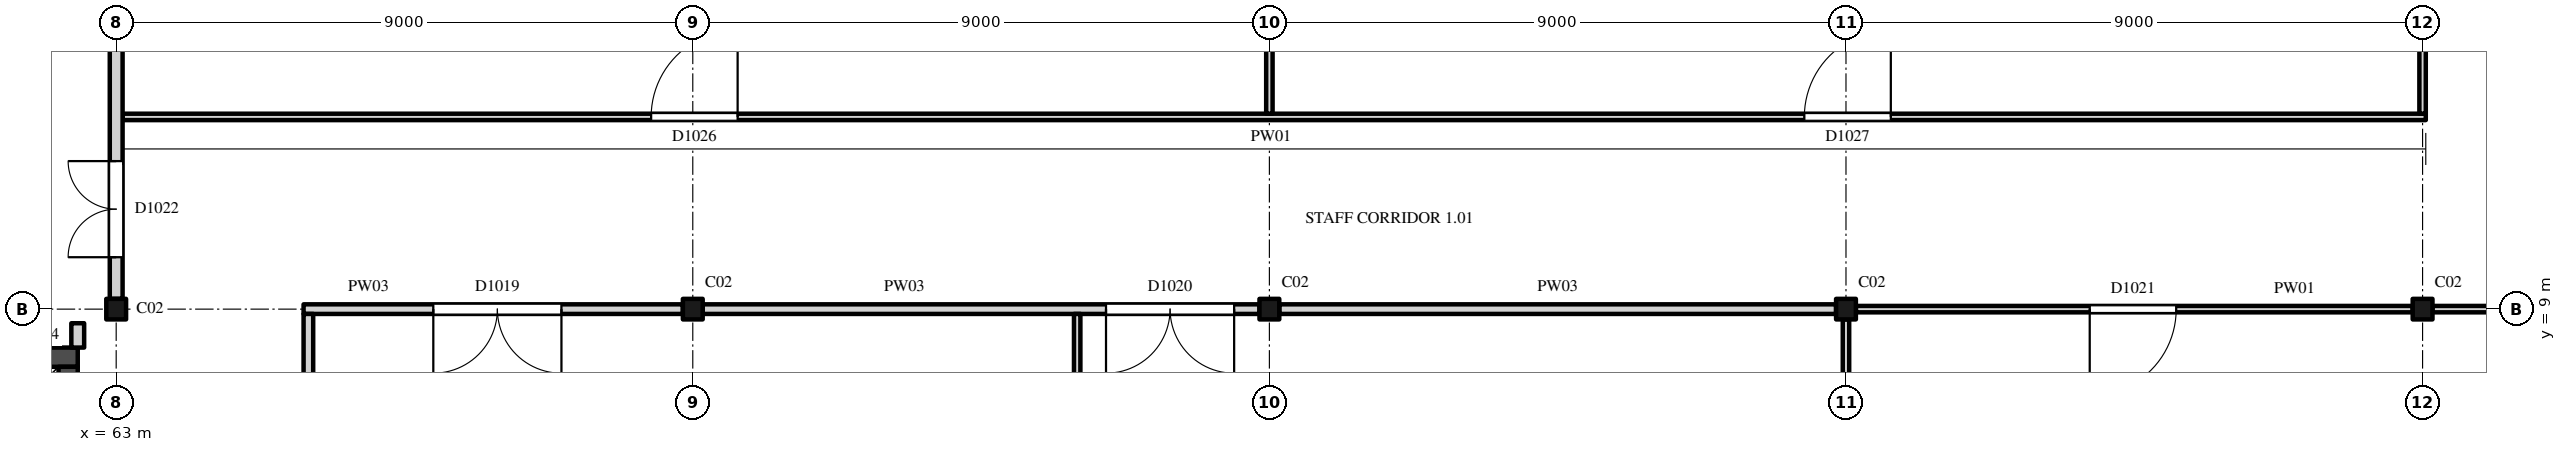
"""IFC4 building model, lengths in metres.
Left out: names, types, materials, properties, quantities, classifications, styles, units other than length and angle.
Written with IfcOpenShell. Run it as: python <this file> out.ifc"""

import sys

from ifc_helpers import new_model, si_unit, direction, frame, frame_2d, origin, origin_2d, place, context, subcontext, project, spatial, rectangle, i_section, extrude, element, fill, save


model = new_model("IFC4")
c1 = context("Model", 3, precision=1e-05, world=origin(), true_north=direction((0.0, 1.0)))
c2 = subcontext(c1, "Body", "Model", "MODEL_VIEW")
j1 = project(units=[si_unit("LENGTHUNIT", "METRE"), si_unit("PLANEANGLEUNIT", "RADIAN")], contexts=[c1])
p1 = place(None, origin())
s1 = spatial("IfcSite", under=j1, at=p1, CompositionType="ELEMENT")
p2 = place(p1, origin())
s2 = spatial("IfcBuilding", under=s1, at=p2, CompositionType="ELEMENT")
p3 = place(p2, frame((0.0, 0.0, 6.0)))
s3 = spatial("IfcBuildingStorey", under=s2, at=p3, CompositionType="ELEMENT", Elevation=6.0)
for number, where, z_axis, x_axis in (
    (1, (63.0, 9.0, 0.0), (0.0, 0.0, 1.0), (1.0, 0.0, 0.0)),
    (2, (72.0, 9.0, 0.0), (0.0, 0.0, 1.0), (1.0, 0.0, 0.0)),
    (3, (81.0, 9.0, 0.0), (0.0, 0.0, 1.0), (1.0, 0.0, 0.0)),
    (4, (90.0, 9.0, 0.0), (0.0, 0.0, 1.0), (1.0, 0.0, 0.0)),
    (5, (99.0, 9.0, 0.0), (0.0, 0.0, 1.0), (1.0, 0.0, 0.0)),
):
    element("IfcColumn", number, at=place(p3, frame(where, z_axis=z_axis, x_axis=x_axis)), inside=s3, PredefinedType="COLUMN", context=c2, shape_type="SweptSolid", body=[
        extrude(i_section(OverallWidth=0.309, OverallDepth=0.321, WebThickness=0.014, FlangeThickness=0.022, FilletRadius=0.017, at=origin_2d()), origin(), (0.0, 0.0, 1.0), 5.0),
    ])
p4 = place(p3, frame((54.3, 8.25, 0.0), z_axis=(0.0, 0.0, 1.0), x_axis=(1.0, 0.0, 0.0)))
e6 = element("IfcWall", 6, at=p4, inside=s3, PredefinedType="SHEAR", context=c2, shape_type="SweptSolid", body=[
    extrude(rectangle(XDim=8.1, YDim=0.3, at=frame_2d((4.05, 0.0))), origin(), (0.0, 0.0, 1.0), 5.0),
])
p5 = place(p3, frame((62.25, 0.3, 0.0), z_axis=(0.0, 0.0, 1.0), x_axis=(0.0, 1.0, 0.0)))
e7 = element("IfcWall", 7, at=p5, inside=s3, PredefinedType="SHEAR", context=c2, shape_type="SweptSolid", body=[
    extrude(rectangle(XDim=7.8, YDim=0.3, at=frame_2d((3.9, 0.0))), origin(), (0.0, 0.0, 1.0), 5.0),
])
p6 = place(p5, frame((3.6, 0.0, 0.0)))
e8 = element("IfcOpeningElement", 8, at=p6, cuts=e7, PredefinedType="OPENING", context=c2, shape_type="SweptSolid", body=[
    extrude(rectangle(XDim=1.2, YDim=2.1, at=frame_2d((0.6, 1.05))), frame((0.0, 0.16, 0.0), z_axis=(0.0, -1.0, 0.0), x_axis=(1.0, 0.0, 0.0)), (0.0, 0.0, 1.0), 0.32),
])
p7 = place(p3, frame((65.925, 9.0, 0.0), z_axis=(0.0, 0.0, 1.0), x_axis=(1.0, 0.0, 0.0)))
e9 = element("IfcWall", 9, at=p7, inside=s3, PredefinedType="PARTITIONING", context=c2, shape_type="SweptSolid", body=[
    extrude(rectangle(XDim=5.92, YDim=0.15, at=frame_2d((2.96, 0.0))), origin(), (0.0, 0.0, 1.0), 4.419),
])
p8 = place(p7, frame((2.025, 0.0, 0.0)))
e10 = element("IfcOpeningElement", 10, at=p8, cuts=e9, PredefinedType="OPENING", context=c2, shape_type="SweptSolid", body=[
    extrude(rectangle(XDim=2.0, YDim=2.4, at=frame_2d((1.0, 1.2))), frame((0.0, 0.085, 0.0), z_axis=(0.0, -1.0, 0.0), x_axis=(1.0, 0.0, 0.0)), (0.0, 0.0, 1.0), 0.17),
])
p9 = place(p3, frame((72.155, 9.0, 0.0), z_axis=(0.0, 0.0, 1.0), x_axis=(1.0, 0.0, 0.0)))
e11 = element("IfcWall", 11, at=p9, inside=s3, PredefinedType="PARTITIONING", context=c2, shape_type="SweptSolid", body=[
    extrude(rectangle(XDim=8.691, YDim=0.15, at=frame_2d((4.345, 0.0))), origin(), (0.0, 0.0, 1.0), 4.419),
])
p10 = place(p9, frame((6.295, 0.0, 0.0)))
e12 = element("IfcOpeningElement", 12, at=p10, cuts=e11, PredefinedType="OPENING", context=c2, shape_type="SweptSolid", body=[
    extrude(rectangle(XDim=2.0, YDim=2.4, at=frame_2d((1.0, 1.2))), frame((0.0, 0.085, 0.0), z_axis=(0.0, -1.0, 0.0), x_axis=(1.0, 0.0, 0.0)), (0.0, 0.0, 1.0), 0.17),
])
p11 = place(p3, frame((81.155, 9.0, 0.0), z_axis=(0.0, 0.0, 1.0), x_axis=(1.0, 0.0, 0.0)))
e13 = element("IfcWall", 13, at=p11, inside=s3, PredefinedType="PARTITIONING", context=c2, shape_type="SweptSolid", body=[
    extrude(rectangle(XDim=8.691, YDim=0.15, at=frame_2d((4.345, 0.0))), origin(), (0.0, 0.0, 1.0), 4.419),
])
p12 = place(p3, frame((90.155, 9.0, 0.0), z_axis=(0.0, 0.0, 1.0), x_axis=(1.0, 0.0, 0.0)))
e14 = element("IfcWall", 14, at=p12, inside=s3, PredefinedType="PARTITIONING", context=c2, shape_type="SweptSolid", body=[
    extrude(rectangle(XDim=8.691, YDim=0.1, at=frame_2d((4.345, 0.0))), origin(), (0.0, 0.0, 1.0), 4.419),
])
p13 = place(p12, frame((3.65, 0.0, 0.0)))
e15 = element("IfcOpeningElement", 15, at=p13, cuts=e14, PredefinedType="OPENING", context=c2, shape_type="SweptSolid", body=[
    extrude(rectangle(XDim=1.35, YDim=2.4, at=frame_2d((0.675, 1.2))), frame((0.0, 0.06, 0.0), z_axis=(0.0, -1.0, 0.0), x_axis=(1.0, 0.0, 0.0)), (0.0, 0.0, 1.0), 0.12),
])
p14 = place(p3, frame((99.155, 9.0, 0.0), z_axis=(0.0, 0.0, 1.0), x_axis=(1.0, 0.0, 0.0)))
e16 = element("IfcWall", 16, at=p14, inside=s3, PredefinedType="PARTITIONING", context=c2, shape_type="SweptSolid", body=[
    extrude(rectangle(XDim=2.896, YDim=0.1, at=frame_2d((1.448, 0.0))), origin(), (0.0, 0.0, 1.0), 4.419),
])
p15 = place(p3, frame((63.1, 12.0, 0.0), z_axis=(0.0, 0.0, 1.0), x_axis=(1.0, 0.0, 0.0)))
e17 = element("IfcWall", 17, at=p15, inside=s3, PredefinedType="PARTITIONING", context=c2, shape_type="SweptSolid", body=[
    extrude(rectangle(XDim=35.95, YDim=0.1, at=frame_2d((17.975, 0.0))), origin(), (0.0, 0.0, 1.0), 4.419),
])
p16 = place(p15, frame((8.25, 0.0, 0.0)))
e18 = element("IfcOpeningElement", 18, at=p16, cuts=e17, PredefinedType="OPENING", context=c2, shape_type="SweptSolid", body=[
    extrude(rectangle(XDim=1.35, YDim=2.4, at=frame_2d((0.675, 1.2))), frame((0.0, 0.06, 0.0), z_axis=(0.0, -1.0, 0.0), x_axis=(1.0, 0.0, 0.0)), (0.0, 0.0, 1.0), 0.12),
])
p17 = place(p15, frame((26.25, 0.0, 0.0)))
e19 = element("IfcOpeningElement", 19, at=p17, cuts=e17, PredefinedType="OPENING", context=c2, shape_type="SweptSolid", body=[
    extrude(rectangle(XDim=1.35, YDim=2.4, at=frame_2d((0.675, 1.2))), frame((0.0, 0.06, 0.0), z_axis=(0.0, -1.0, 0.0), x_axis=(1.0, 0.0, 0.0)), (0.0, 0.0, 1.0), 0.12),
])
p18 = place(p3, frame((62.4, 8.4, 0.0), z_axis=(0.0, 0.0, 1.0), x_axis=(0.0, 1.0, 0.0)))
e20 = element("IfcWall", 20, at=p18, inside=s3, PredefinedType="PARTITIONING", context=c2, shape_type="SweptSolid", body=[
    extrude(rectangle(XDim=0.38, YDim=0.2, at=frame_2d((0.19, 0.0))), origin(), (0.0, 0.0, 1.0), 4.825),
])
p19 = place(p3, frame((63.0, 9.16, 0.0), z_axis=(0.0, 0.0, 1.0), x_axis=(0.0, 1.0, 0.0)))
e21 = element("IfcWall", 21, at=p19, inside=s3, PredefinedType="PARTITIONING", context=c2, shape_type="SweptSolid", body=[
    extrude(rectangle(XDim=8.679, YDim=0.2, at=frame_2d((4.34, 0.0))), origin(), (0.0, 0.0, 1.0), 4.297),
])
p20 = place(p19, frame((0.65, 0.0, 0.0)))
e22 = element("IfcOpeningElement", 22, at=p20, cuts=e21, PredefinedType="OPENING", context=c2, shape_type="SweptSolid", body=[
    extrude(rectangle(XDim=1.5, YDim=2.4, at=frame_2d((0.75, 1.2))), frame((0.0, 0.11, 0.0), z_axis=(0.0, -1.0, 0.0), x_axis=(1.0, 0.0, 0.0)), (0.0, 0.0, 1.0), 0.22),
])
p21 = place(p3, frame((66.0, 0.3, 0.0), z_axis=(0.0, 0.0, 1.0), x_axis=(0.0, 1.0, 0.0)))
e23 = element("IfcWall", 23, at=p21, inside=s3, PredefinedType="PARTITIONING", context=c2, shape_type="SweptSolid", body=[
    extrude(rectangle(XDim=8.625, YDim=0.15, at=frame_2d((4.312, 0.0))), origin(), (0.0, 0.0, 1.0), 4.825),
])
p22 = place(p3, frame((78.0, 0.3, 0.0), z_axis=(0.0, 0.0, 1.0), x_axis=(0.0, 1.0, 0.0)))
e24 = element("IfcWall", 24, at=p22, inside=s3, PredefinedType="PARTITIONING", context=c2, shape_type="SweptSolid", body=[
    extrude(rectangle(XDim=8.625, YDim=0.1, at=frame_2d((4.312, 0.0))), origin(), (0.0, 0.0, 1.0), 4.825),
])
p23 = place(p3, frame((81.0, 12.05, 0.0), z_axis=(0.0, 0.0, 1.0), x_axis=(0.0, 1.0, 0.0)))
e25 = element("IfcWall", 25, at=p23, inside=s3, PredefinedType="PARTITIONING", context=c2, shape_type="SweptSolid", body=[
    extrude(rectangle(XDim=5.79, YDim=0.1, at=frame_2d((2.895, 0.0))), origin(), (0.0, 0.0, 1.0), 4.297),
])
p24 = place(p3, frame((90.0, 0.3, 0.0), z_axis=(0.0, 0.0, 1.0), x_axis=(0.0, 1.0, 0.0)))
e26 = element("IfcWall", 26, at=p24, inside=s3, PredefinedType="PARTITIONING", context=c2, shape_type="SweptSolid", body=[
    extrude(rectangle(XDim=8.54, YDim=0.1, at=frame_2d((4.27, 0.0))), origin(), (0.0, 0.0, 1.0), 4.297),
])
p25 = place(p3, frame((99.0, 12.05, 0.0), z_axis=(0.0, 0.0, 1.0), x_axis=(0.0, 1.0, 0.0)))
e27 = element("IfcWall", 27, at=p25, inside=s3, PredefinedType="PARTITIONING", context=c2, shape_type="SweptSolid", body=[
    extrude(rectangle(XDim=5.79, YDim=0.1, at=frame_2d((2.895, 0.0))), origin(), (0.0, 0.0, 1.0), 4.297),
])
p26 = place(p8, origin())
e28 = element("IfcDoor", 28, at=p26, inside=s3, OperationType="DOUBLE_DOOR_SINGLE_SWING", PredefinedType="DOOR", context=c2, shape_type="SweptSolid", body=[
    extrude(rectangle(XDim=2.0, YDim=2.4, at=frame_2d((1.0, 1.2))), frame((0.0, 0.025, 0.0), z_axis=(0.0, -1.0, 0.0), x_axis=(1.0, 0.0, 0.0)), (0.0, 0.0, 1.0), 0.05),
])
fill(e10, e28)
p27 = place(p10, origin())
e29 = element("IfcDoor", 29, at=p27, inside=s3, OperationType="DOUBLE_DOOR_SINGLE_SWING", PredefinedType="DOOR", context=c2, shape_type="SweptSolid", body=[
    extrude(rectangle(XDim=2.0, YDim=2.4, at=frame_2d((1.0, 1.2))), frame((0.0, 0.025, 0.0), z_axis=(0.0, -1.0, 0.0), x_axis=(1.0, 0.0, 0.0)), (0.0, 0.0, 1.0), 0.05),
])
fill(e12, e29)
p28 = place(p13, origin())
e30 = element("IfcDoor", 30, at=p28, inside=s3, OperationType="SINGLE_SWING_LEFT", PredefinedType="DOOR", context=c2, shape_type="SweptSolid", body=[
    extrude(rectangle(XDim=1.35, YDim=2.4, at=frame_2d((0.675, 1.2))), frame((0.0, 0.025, 0.0), z_axis=(0.0, -1.0, 0.0), x_axis=(1.0, 0.0, 0.0)), (0.0, 0.0, 1.0), 0.05),
])
fill(e15, e30)
p29 = place(p20, origin())
e31 = element("IfcDoor", 31, at=p29, inside=s3, OperationType="DOUBLE_DOOR_SINGLE_SWING", PredefinedType="DOOR", context=c2, shape_type="SweptSolid", body=[
    extrude(rectangle(XDim=1.5, YDim=2.4, at=frame_2d((0.75, 1.2))), frame((0.0, 0.025, 0.0), z_axis=(0.0, -1.0, 0.0), x_axis=(1.0, 0.0, 0.0)), (0.0, 0.0, 1.0), 0.05),
])
fill(e22, e31)
p30 = place(p16, origin())
e32 = element("IfcDoor", 32, at=p30, inside=s3, OperationType="SINGLE_SWING_LEFT", PredefinedType="DOOR", context=c2, shape_type="SweptSolid", body=[
    extrude(rectangle(XDim=1.35, YDim=2.4, at=frame_2d((0.675, 1.2))), frame((0.0, 0.025, 0.0), z_axis=(0.0, -1.0, 0.0), x_axis=(1.0, 0.0, 0.0)), (0.0, 0.0, 1.0), 0.05),
])
fill(e18, e32)
p31 = place(p17, origin())
e33 = element("IfcDoor", 33, at=p31, inside=s3, OperationType="SINGLE_SWING_LEFT", PredefinedType="DOOR", context=c2, shape_type="SweptSolid", body=[
    extrude(rectangle(XDim=1.35, YDim=2.4, at=frame_2d((0.675, 1.2))), frame((0.0, 0.025, 0.0), z_axis=(0.0, -1.0, 0.0), x_axis=(1.0, 0.0, 0.0)), (0.0, 0.0, 1.0), 0.05),
])
fill(e19, e33)
save(model, sys.argv[1])
